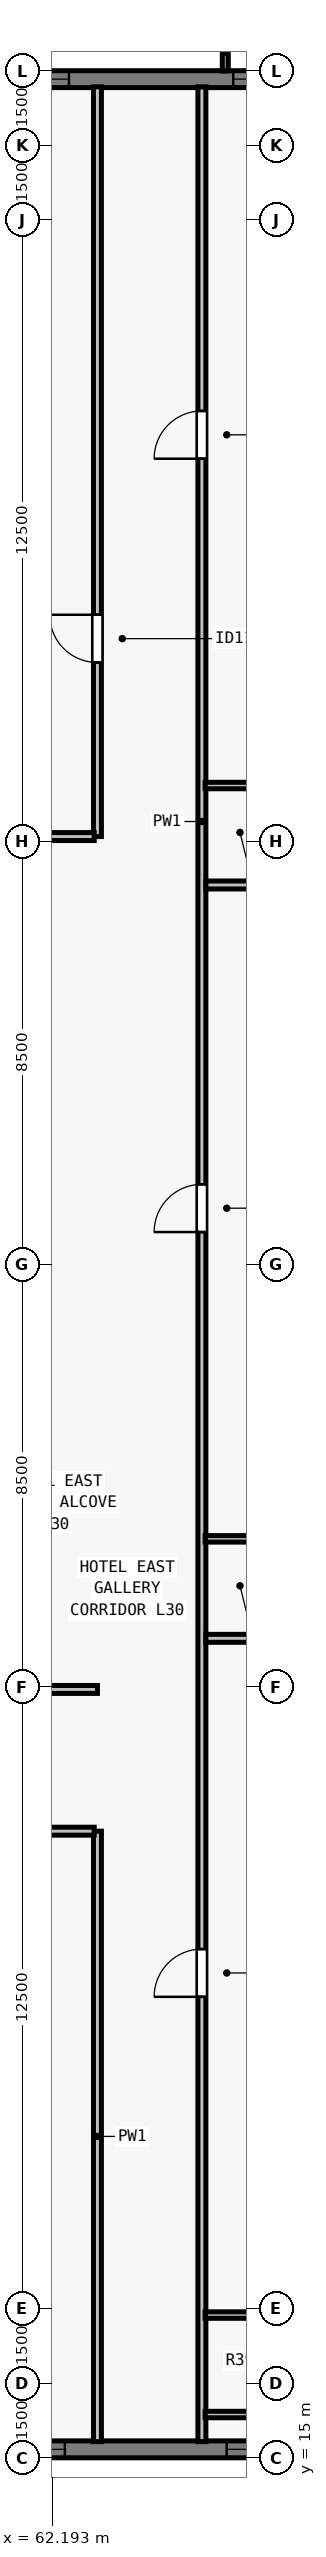
"""IFC4 building model, lengths in metres.
Left out: names, types, materials, properties, quantities, classifications, styles, units other than length and angle.
Written with IfcOpenShell. Run it as: python <this file> out.ifc"""

import sys

from ifc_helpers import new_model, si_unit, direction, frame, frame_2d, origin, place, context, subcontext, project, spatial, rectangle, extrude, element, fill, save


model = new_model("IFC4")
c1 = context("Model", 3, precision=1e-05, world=origin(), true_north=direction((0.0, 1.0)))
c2 = subcontext(c1, "Body", "Model", "MODEL_VIEW")
j1 = project(units=[si_unit("LENGTHUNIT", "METRE"), si_unit("PLANEANGLEUNIT", "RADIAN")], contexts=[c1])
p1 = place(None, origin())
s1 = spatial("IfcSite", under=j1, at=p1, CompositionType="ELEMENT")
p2 = place(p1, origin())
s2 = spatial("IfcBuilding", under=s1, at=p2, CompositionType="ELEMENT")
p3 = place(p2, frame((0.0, 0.0, 113.0)))
s3 = spatial("IfcBuildingStorey", under=s2, at=p3, CompositionType="ELEMENT", Elevation=113.0)
p4 = place(p3, frame((32.0, 62.83, 0.0), z_axis=(0.0, 0.0, 1.0), x_axis=(1.0, 0.0, 0.0)))
e1 = element("IfcWall", 1, at=p4, inside=s3, PredefinedType="SOLIDWALL", context=c2, shape_type="SweptSolid", body=[
    extrude(rectangle(XDim=39.682, YDim=0.34, at=frame_2d((19.841, 0.0))), origin(), (0.0, 0.0, 1.0), 3.28),
])
p5 = place(p4, frame((4.952, 0.0, 0.8)))
e2 = element("IfcOpeningElement", 2, at=p5, cuts=e1, PredefinedType="OPENING", context=c2, shape_type="SweptSolid", body=[
    extrude(rectangle(XDim=1.35, YDim=1.66, at=frame_2d((0.675, 0.83))), frame((0.0, 0.18, 0.0), z_axis=(0.0, -1.0, 0.0), x_axis=(1.0, 0.0, 0.0)), (0.0, 0.0, 1.0), 0.36),
])
p6 = place(p4, frame((9.555, 0.0, 0.8)))
e3 = element("IfcOpeningElement", 3, at=p6, cuts=e1, PredefinedType="OPENING", context=c2, shape_type="SweptSolid", body=[
    extrude(rectangle(XDim=1.75, YDim=1.66, at=frame_2d((0.875, 0.83))), frame((0.0, 0.18, 0.0), z_axis=(0.0, -1.0, 0.0), x_axis=(1.0, 0.0, 0.0)), (0.0, 0.0, 1.0), 0.36),
])
p7 = place(p4, frame((12.059, 0.0, 0.8)))
e4 = element("IfcOpeningElement", 4, at=p7, cuts=e1, PredefinedType="OPENING", context=c2, shape_type="SweptSolid", body=[
    extrude(rectangle(XDim=1.35, YDim=1.66, at=frame_2d((0.675, 0.83))), frame((0.0, 0.18, 0.0), z_axis=(0.0, -1.0, 0.0), x_axis=(1.0, 0.0, 0.0)), (0.0, 0.0, 1.0), 0.36),
])
p8 = place(p4, frame((19.166, 0.0, 0.8)))
e5 = element("IfcOpeningElement", 5, at=p8, cuts=e1, PredefinedType="OPENING", context=c2, shape_type="SweptSolid", body=[
    extrude(rectangle(XDim=1.35, YDim=1.66, at=frame_2d((0.675, 0.83))), frame((0.0, 0.18, 0.0), z_axis=(0.0, -1.0, 0.0), x_axis=(1.0, 0.0, 0.0)), (0.0, 0.0, 1.0), 0.36),
])
p9 = place(p4, frame((21.27, 0.0, 0.8)))
e6 = element("IfcOpeningElement", 6, at=p9, cuts=e1, PredefinedType="OPENING", context=c2, shape_type="SweptSolid", body=[
    extrude(rectangle(XDim=1.75, YDim=1.66, at=frame_2d((0.875, 0.83))), frame((0.0, 0.18, 0.0), z_axis=(0.0, -1.0, 0.0), x_axis=(1.0, 0.0, 0.0)), (0.0, 0.0, 1.0), 0.36),
])
p10 = place(p4, frame((26.273, 0.0, 0.8)))
e7 = element("IfcOpeningElement", 7, at=p10, cuts=e1, PredefinedType="OPENING", context=c2, shape_type="SweptSolid", body=[
    extrude(rectangle(XDim=1.35, YDim=1.66, at=frame_2d((0.675, 0.83))), frame((0.0, 0.18, 0.0), z_axis=(0.0, -1.0, 0.0), x_axis=(1.0, 0.0, 0.0)), (0.0, 0.0, 1.0), 0.36),
])
p11 = place(p4, frame((28.777, 0.0, 0.8)))
e8 = element("IfcOpeningElement", 8, at=p11, cuts=e1, PredefinedType="OPENING", context=c2, shape_type="SweptSolid", body=[
    extrude(rectangle(XDim=1.75, YDim=1.66, at=frame_2d((0.875, 0.83))), frame((0.0, 0.18, 0.0), z_axis=(0.0, -1.0, 0.0), x_axis=(1.0, 0.0, 0.0)), (0.0, 0.0, 1.0), 0.36),
])
p12 = place(p4, frame((33.83, 0.0, 0.8)))
e9 = element("IfcOpeningElement", 9, at=p12, cuts=e1, PredefinedType="OPENING", context=c2, shape_type="SweptSolid", body=[
    extrude(rectangle(XDim=1.35, YDim=1.66, at=frame_2d((0.675, 0.83))), frame((0.0, 0.18, 0.0), z_axis=(0.0, -1.0, 0.0), x_axis=(1.0, 0.0, 0.0)), (0.0, 0.0, 1.0), 0.36),
])
p13 = place(p3, frame((72.0, 15.17, 0.0), z_axis=(0.0, 0.0, 1.0), x_axis=(-1.0, 0.0, 0.0)))
e10 = element("IfcWall", 10, at=p13, inside=s3, PredefinedType="SOLIDWALL", context=c2, shape_type="SweptSolid", body=[
    extrude(rectangle(XDim=39.682, YDim=0.34, at=frame_2d((19.841, 0.0))), origin(), (0.0, 0.0, 1.0), 3.28),
])
p14 = place(p13, frame((4.952, 0.0, 0.8)))
e11 = element("IfcOpeningElement", 11, at=p14, cuts=e10, PredefinedType="OPENING", context=c2, shape_type="SweptSolid", body=[
    extrude(rectangle(XDim=1.35, YDim=1.66, at=frame_2d((0.675, 0.83))), frame((0.0, 0.18, 0.0), z_axis=(0.0, -1.0, 0.0), x_axis=(1.0, 0.0, 0.0)), (0.0, 0.0, 1.0), 0.36),
])
p15 = place(p13, frame((9.555, 0.0, 0.8)))
e12 = element("IfcOpeningElement", 12, at=p15, cuts=e10, PredefinedType="OPENING", context=c2, shape_type="SweptSolid", body=[
    extrude(rectangle(XDim=1.75, YDim=1.66, at=frame_2d((0.875, 0.83))), frame((0.0, 0.18, 0.0), z_axis=(0.0, -1.0, 0.0), x_axis=(1.0, 0.0, 0.0)), (0.0, 0.0, 1.0), 0.36),
])
p16 = place(p13, frame((12.059, 0.0, 0.8)))
e13 = element("IfcOpeningElement", 13, at=p16, cuts=e10, PredefinedType="OPENING", context=c2, shape_type="SweptSolid", body=[
    extrude(rectangle(XDim=1.35, YDim=1.66, at=frame_2d((0.675, 0.83))), frame((0.0, 0.18, 0.0), z_axis=(0.0, -1.0, 0.0), x_axis=(1.0, 0.0, 0.0)), (0.0, 0.0, 1.0), 0.36),
])
p17 = place(p13, frame((16.262, 0.0, 0.8)))
e14 = element("IfcOpeningElement", 14, at=p17, cuts=e10, PredefinedType="OPENING", context=c2, shape_type="SweptSolid", body=[
    extrude(rectangle(XDim=1.75, YDim=1.66, at=frame_2d((0.875, 0.83))), frame((0.0, 0.18, 0.0), z_axis=(0.0, -1.0, 0.0), x_axis=(1.0, 0.0, 0.0)), (0.0, 0.0, 1.0), 0.36),
])
p18 = place(p13, frame((18.716, 0.0, 0.8)))
e15 = element("IfcOpeningElement", 15, at=p18, cuts=e10, PredefinedType="OPENING", context=c2, shape_type="SweptSolid", body=[
    extrude(rectangle(XDim=1.35, YDim=1.66, at=frame_2d((0.675, 0.83))), frame((0.0, 0.18, 0.0), z_axis=(0.0, -1.0, 0.0), x_axis=(1.0, 0.0, 0.0)), (0.0, 0.0, 1.0), 0.36),
])
p19 = place(p13, frame((22.07, 0.0, 0.8)))
e16 = element("IfcOpeningElement", 16, at=p19, cuts=e10, PredefinedType="OPENING", context=c2, shape_type="SweptSolid", body=[
    extrude(rectangle(XDim=1.75, YDim=1.66, at=frame_2d((0.875, 0.83))), frame((0.0, 0.18, 0.0), z_axis=(0.0, -1.0, 0.0), x_axis=(1.0, 0.0, 0.0)), (0.0, 0.0, 1.0), 0.36),
])
p20 = place(p13, frame((26.273, 0.0, 0.8)))
e17 = element("IfcOpeningElement", 17, at=p20, cuts=e10, PredefinedType="OPENING", context=c2, shape_type="SweptSolid", body=[
    extrude(rectangle(XDim=1.35, YDim=1.66, at=frame_2d((0.675, 0.83))), frame((0.0, 0.18, 0.0), z_axis=(0.0, -1.0, 0.0), x_axis=(1.0, 0.0, 0.0)), (0.0, 0.0, 1.0), 0.36),
])
p21 = place(p13, frame((28.777, 0.0, 0.8)))
e18 = element("IfcOpeningElement", 18, at=p21, cuts=e10, PredefinedType="OPENING", context=c2, shape_type="SweptSolid", body=[
    extrude(rectangle(XDim=1.75, YDim=1.66, at=frame_2d((0.875, 0.83))), frame((0.0, 0.18, 0.0), z_axis=(0.0, -1.0, 0.0), x_axis=(1.0, 0.0, 0.0)), (0.0, 0.0, 1.0), 0.36),
])
p22 = place(p13, frame((33.83, 0.0, 0.8)))
e19 = element("IfcOpeningElement", 19, at=p22, cuts=e10, PredefinedType="OPENING", context=c2, shape_type="SweptSolid", body=[
    extrude(rectangle(XDim=1.35, YDim=1.66, at=frame_2d((0.675, 0.83))), frame((0.0, 0.18, 0.0), z_axis=(0.0, -1.0, 0.0), x_axis=(1.0, 0.0, 0.0)), (0.0, 0.0, 1.0), 0.36),
])
p23 = place(p3, frame((65.2, 15.325, 0.0), z_axis=(0.0, 0.0, 1.0), x_axis=(0.0, 1.0, 0.0)))
e20 = element("IfcWall", 20, at=p23, inside=s3, PredefinedType="PARTITIONING", context=c2, shape_type="SweptSolid", body=[
    extrude(rectangle(XDim=47.35, YDim=0.16, at=frame_2d((23.675, 0.0))), origin(), (0.0, 0.0, 1.0), 2.555),
])
p24 = place(p23, frame((8.944, 0.0, 0.0)))
e21 = element("IfcOpeningElement", 21, at=p24, cuts=e20, PredefinedType="OPENING", context=c2, shape_type="SweptSolid", body=[
    extrude(rectangle(XDim=0.96, YDim=2.15, at=frame_2d((0.48, 1.075))), frame((0.0, 0.09, 0.0), z_axis=(0.0, -1.0, 0.0), x_axis=(1.0, 0.0, 0.0)), (0.0, 0.0, 1.0), 0.18),
])
p25 = place(p23, frame((24.322, 0.0, 0.0)))
e22 = element("IfcOpeningElement", 22, at=p25, cuts=e20, PredefinedType="OPENING", context=c2, shape_type="SweptSolid", body=[
    extrude(rectangle(XDim=0.96, YDim=2.15, at=frame_2d((0.48, 1.075))), frame((0.0, 0.09, 0.0), z_axis=(0.0, -1.0, 0.0), x_axis=(1.0, 0.0, 0.0)), (0.0, 0.0, 1.0), 0.18),
])
p26 = place(p23, frame((39.873, 0.0, 0.0)))
e23 = element("IfcOpeningElement", 23, at=p26, cuts=e20, PredefinedType="OPENING", context=c2, shape_type="SweptSolid", body=[
    extrude(rectangle(XDim=0.96, YDim=2.15, at=frame_2d((0.48, 1.075))), frame((0.0, 0.09, 0.0), z_axis=(0.0, -1.0, 0.0), x_axis=(1.0, 0.0, 0.0)), (0.0, 0.0, 1.0), 0.18),
])
p27 = place(p3, frame((63.1, 15.325, 0.0), z_axis=(0.0, 0.0, 1.0), x_axis=(0.0, 1.0, 0.0)))
e24 = element("IfcWall", 24, at=p27, inside=s3, PredefinedType="PARTITIONING", context=c2, shape_type="SweptSolid", body=[
    extrude(rectangle(XDim=12.275, YDim=0.16, at=frame_2d((6.138, 0.0))), origin(), (0.0, 0.0, 1.0), 2.555),
])
p28 = place(p3, frame((63.1, 47.6, 0.0), z_axis=(0.0, 0.0, 1.0), x_axis=(0.0, 1.0, 0.0)))
e25 = element("IfcWall", 25, at=p28, inside=s3, PredefinedType="PARTITIONING", context=c2, shape_type="SweptSolid", body=[
    extrude(rectangle(XDim=15.075, YDim=0.16, at=frame_2d((7.538, 0.0))), origin(), (0.0, 0.0, 1.0), 2.555),
])
p29 = place(p28, frame((3.5, 0.0, 0.0)))
e26 = element("IfcOpeningElement", 26, at=p29, cuts=e25, PredefinedType="OPENING", context=c2, shape_type="SweptSolid", body=[
    extrude(rectangle(XDim=0.96, YDim=2.12, at=frame_2d((0.48, 1.06))), frame((0.0, 0.09, 0.0), z_axis=(0.0, -1.0, 0.0), x_axis=(1.0, 0.0, 0.0)), (0.0, 0.0, 1.0), 0.18),
])
p30 = place(p3, frame((60.765, 30.45, 0.0), z_axis=(0.0, 0.0, 1.0), x_axis=(1.0, 0.0, 0.0)))
e27 = element("IfcWall", 27, at=p30, inside=s3, PredefinedType="PARTITIONING", context=c2, shape_type="SweptSolid", body=[
    extrude(rectangle(XDim=2.335, YDim=0.16, at=frame_2d((1.167, 0.0))), origin(), (0.0, 0.0, 1.0), 3.28),
])
p31 = place(p3, frame((60.765, 47.6, 0.0), z_axis=(0.0, 0.0, 1.0), x_axis=(1.0, 0.0, 0.0)))
e28 = element("IfcWall", 28, at=p31, inside=s3, PredefinedType="PARTITIONING", context=c2, shape_type="SweptSolid", body=[
    extrude(rectangle(XDim=2.27, YDim=0.16, at=frame_2d((1.135, 0.0))), origin(), (0.0, 0.0, 1.0), 3.28),
])
p32 = place(p3, frame((40.965, 27.6, 0.0), z_axis=(0.0, 0.0, 1.0), x_axis=(1.0, 0.0, 0.0)))
e29 = element("IfcWall", 29, at=p32, inside=s3, PredefinedType="PARTITIONING", context=c2, shape_type="SweptSolid", body=[
    extrude(rectangle(XDim=22.07, YDim=0.16, at=frame_2d((11.035, 0.0))), origin(), (0.0, 0.0, 1.0), 3.28),
])
p33 = place(p32, frame((6.085, 0.0, 0.0)))
e30 = element("IfcOpeningElement", 30, at=p33, cuts=e29, PredefinedType="OPENING", context=c2, shape_type="SweptSolid", body=[
    extrude(rectangle(XDim=0.96, YDim=2.15, at=frame_2d((0.48, 1.075))), frame((0.0, 0.09, 0.0), z_axis=(0.0, -1.0, 0.0), x_axis=(1.0, 0.0, 0.0)), (0.0, 0.0, 1.0), 0.18),
])
p34 = place(p32, frame((16.88, 0.0, 0.0)))
e31 = element("IfcOpeningElement", 31, at=p34, cuts=e29, PredefinedType="OPENING", context=c2, shape_type="SweptSolid", body=[
    extrude(rectangle(XDim=0.96, YDim=2.15, at=frame_2d((0.48, 1.075))), frame((0.0, 0.09, 0.0), z_axis=(0.0, -1.0, 0.0), x_axis=(1.0, 0.0, 0.0)), (0.0, 0.0, 1.0), 0.18),
])
for number, where, z_axis, x_axis in (
    (32, (65.265, 15.87, 0.0), (0.0, 0.0, 1.0), (1.0, 0.0, 0.0)),
    (33, (65.265, 17.87, 0.0), (0.0, 0.0, 1.0), (1.0, 0.0, 0.0)),
):
    element("IfcWall", number, at=place(p3, frame(where, z_axis=z_axis, x_axis=x_axis)), inside=s3, PredefinedType="PLUMBINGWALL", context=c2, shape_type="SweptSolid", body=[
        extrude(rectangle(XDim=2.315, YDim=0.13, at=frame_2d((1.158, 0.0))), origin(), (0.0, 0.0, 1.0), 3.28),
    ])
p35 = place(p3, frame((65.28, 31.478, 0.0), z_axis=(0.0, 0.0, 1.0), x_axis=(1.0, 0.0, 0.0)))
e34 = element("IfcWall", 34, at=p35, inside=s3, PredefinedType="PARTITIONING", context=c2, shape_type="SweptSolid", body=[
    extrude(rectangle(XDim=10.395, YDim=0.16, at=frame_2d((5.198, 0.0))), origin(), (0.0, 0.0, 1.0), 3.28),
])
p36 = place(p3, frame((65.265, 33.478, 0.0), z_axis=(0.0, 0.0, 1.0), x_axis=(1.0, 0.0, 0.0)))
e35 = element("IfcWall", 35, at=p36, inside=s3, PredefinedType="PLUMBINGWALL", context=c2, shape_type="SweptSolid", body=[
    extrude(rectangle(XDim=2.315, YDim=0.13, at=frame_2d((1.158, 0.0))), origin(), (0.0, 0.0, 1.0), 3.28),
])
p37 = place(p3, frame((65.28, 46.626, 0.0), z_axis=(0.0, 0.0, 1.0), x_axis=(1.0, 0.0, 0.0)))
e36 = element("IfcWall", 36, at=p37, inside=s3, PredefinedType="PARTITIONING", context=c2, shape_type="SweptSolid", body=[
    extrude(rectangle(XDim=10.395, YDim=0.16, at=frame_2d((5.198, 0.0))), origin(), (0.0, 0.0, 1.0), 3.28),
])
p38 = place(p3, frame((65.265, 48.626, 0.0), z_axis=(0.0, 0.0, 1.0), x_axis=(1.0, 0.0, 0.0)))
e37 = element("IfcWall", 37, at=p38, inside=s3, PredefinedType="PLUMBINGWALL", context=c2, shape_type="SweptSolid", body=[
    extrude(rectangle(XDim=2.315, YDim=0.13, at=frame_2d((1.158, 0.0))), origin(), (0.0, 0.0, 1.0), 3.28),
])
p39 = place(p11, origin())
e38 = element("IfcWindow", 38, at=p39, inside=s3, PartitioningType="SINGLE_PANEL", PredefinedType="WINDOW", context=c2, shape_type="SweptSolid", body=[
    extrude(rectangle(XDim=1.75, YDim=1.66, at=frame_2d((0.875, 0.83))), frame((0.0, -0.05, 0.0), z_axis=(0.0, -1.0, 0.0), x_axis=(1.0, 0.0, 0.0)), (0.0, 0.0, 1.0), 0.06),
])
fill(e8, e38)
p40 = place(p12, origin())
e39 = element("IfcWindow", 39, at=p40, inside=s3, PartitioningType="SINGLE_PANEL", PredefinedType="WINDOW", context=c2, shape_type="SweptSolid", body=[
    extrude(rectangle(XDim=1.35, YDim=1.66, at=frame_2d((0.675, 0.83))), frame((0.0, -0.05, 0.0), z_axis=(0.0, -1.0, 0.0), x_axis=(1.0, 0.0, 0.0)), (0.0, 0.0, 1.0), 0.06),
])
fill(e9, e39)
p41 = place(p14, origin())
e40 = element("IfcWindow", 40, at=p41, inside=s3, PartitioningType="SINGLE_PANEL", PredefinedType="WINDOW", context=c2, shape_type="SweptSolid", body=[
    extrude(rectangle(XDim=1.35, YDim=1.66, at=frame_2d((0.675, 0.83))), frame((0.0, -0.05, 0.0), z_axis=(0.0, -1.0, 0.0), x_axis=(1.0, 0.0, 0.0)), (0.0, 0.0, 1.0), 0.06),
])
fill(e11, e40)
p42 = place(p15, origin())
e41 = element("IfcWindow", 41, at=p42, inside=s3, PartitioningType="SINGLE_PANEL", PredefinedType="WINDOW", context=c2, shape_type="SweptSolid", body=[
    extrude(rectangle(XDim=1.75, YDim=1.66, at=frame_2d((0.875, 0.83))), frame((0.0, -0.05, 0.0), z_axis=(0.0, -1.0, 0.0), x_axis=(1.0, 0.0, 0.0)), (0.0, 0.0, 1.0), 0.06),
])
fill(e12, e41)
p43 = place(p29, origin())
e42 = element("IfcDoor", 42, at=p43, inside=s3, OperationType="SINGLE_SWING_RIGHT", PredefinedType="DOOR", context=c2, shape_type="SweptSolid", body=[
    extrude(rectangle(XDim=0.96, YDim=2.12, at=frame_2d((0.48, 1.06))), frame((0.0, 0.025, 0.0), z_axis=(0.0, -1.0, 0.0), x_axis=(1.0, 0.0, 0.0)), (0.0, 0.0, 1.0), 0.05),
])
fill(e26, e42)
p44 = place(p24, origin())
e43 = element("IfcDoor", 43, at=p44, inside=s3, OperationType="SINGLE_SWING_LEFT", PredefinedType="DOOR", context=c2, shape_type="SweptSolid", body=[
    extrude(rectangle(XDim=0.96, YDim=2.15, at=frame_2d((0.48, 1.075))), frame((0.0, 0.025, 0.0), z_axis=(0.0, -1.0, 0.0), x_axis=(1.0, 0.0, 0.0)), (0.0, 0.0, 1.0), 0.05),
])
fill(e21, e43)
p45 = place(p25, origin())
e44 = element("IfcDoor", 44, at=p45, inside=s3, OperationType="SINGLE_SWING_LEFT", PredefinedType="DOOR", context=c2, shape_type="SweptSolid", body=[
    extrude(rectangle(XDim=0.96, YDim=2.15, at=frame_2d((0.48, 1.075))), frame((0.0, 0.025, 0.0), z_axis=(0.0, -1.0, 0.0), x_axis=(1.0, 0.0, 0.0)), (0.0, 0.0, 1.0), 0.05),
])
fill(e22, e44)
p46 = place(p26, origin())
e45 = element("IfcDoor", 45, at=p46, inside=s3, OperationType="SINGLE_SWING_LEFT", PredefinedType="DOOR", context=c2, shape_type="SweptSolid", body=[
    extrude(rectangle(XDim=0.96, YDim=2.15, at=frame_2d((0.48, 1.075))), frame((0.0, 0.025, 0.0), z_axis=(0.0, -1.0, 0.0), x_axis=(1.0, 0.0, 0.0)), (0.0, 0.0, 1.0), 0.05),
])
fill(e23, e45)
save(model, sys.argv[1])
